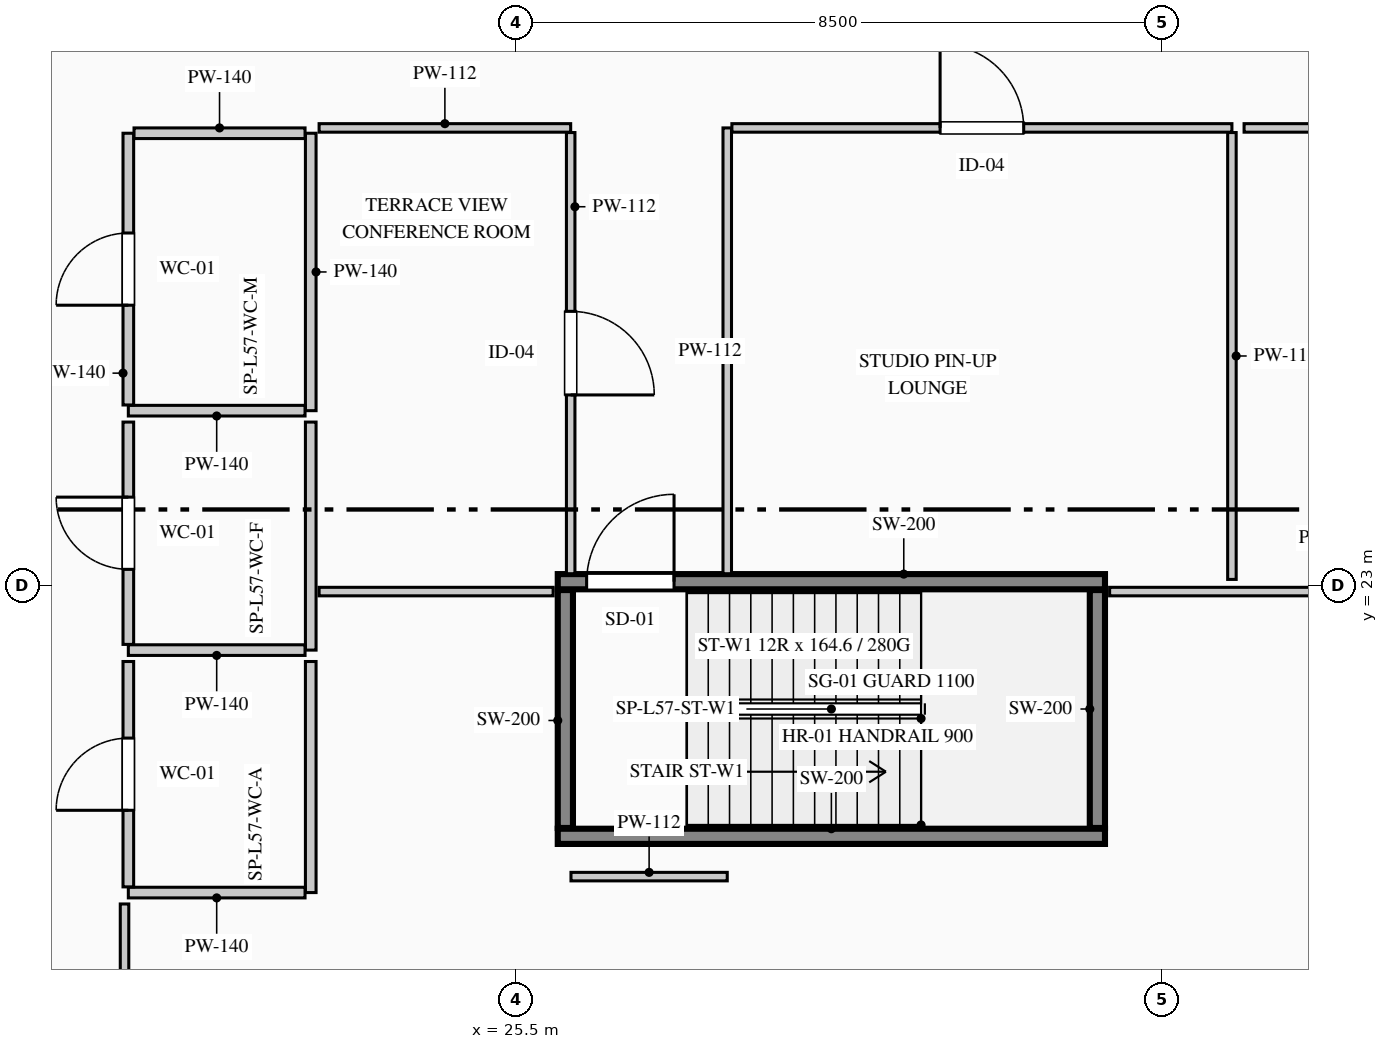
"""IFC4 building model, lengths in metres.
Left out: names, types, materials, properties, quantities, classifications, styles, units other than length and angle.
Written with IfcOpenShell. Run it as: python <this file> out.ifc"""

import sys

from ifc_helpers import new_model, si_unit, direction, frame, frame_2d, origin, place, context, subcontext, project, spatial, rectangle, extrude, element, fill, save


model = new_model("IFC4")
c1 = context("Model", 3, precision=1e-05, world=origin(), true_north=direction((0.0, 1.0)))
c2 = subcontext(c1, "Body", "Model", "MODEL_VIEW")
j1 = project(units=[si_unit("LENGTHUNIT", "METRE"), si_unit("PLANEANGLEUNIT", "RADIAN")], contexts=[c1])
p1 = place(None, origin())
s1 = spatial("IfcSite", under=j1, at=p1, CompositionType="ELEMENT")
p2 = place(p1, origin())
s2 = spatial("IfcBuilding", under=s1, at=p2, CompositionType="ELEMENT")
p3 = place(p2, frame((0.0, 0.0, 239.05)))
s3 = spatial("IfcBuildingStorey", under=s2, at=p3, CompositionType="ELEMENT", Elevation=239.05)
p4 = place(p3, frame((26.05, 19.7, 0.0), z_axis=(0.0, 0.0, 1.0), x_axis=(1.0, 0.0, 0.0)))
e1 = element("IfcWall", 1, at=p4, inside=s3, PredefinedType="SHEAR", context=c2, shape_type="SweptSolid", body=[
    extrude(rectangle(XDim=7.2, YDim=0.2, at=frame_2d((3.6, 0.0))), origin(), (0.0, 0.0, 1.0), 3.95),
])
p5 = place(p3, frame((26.05, 23.05, 0.0), z_axis=(0.0, 0.0, 1.0), x_axis=(1.0, 0.0, 0.0)))
e2 = element("IfcWall", 2, at=p5, inside=s3, PredefinedType="SHEAR", context=c2, shape_type="SweptSolid", body=[
    extrude(rectangle(XDim=7.2, YDim=0.2, at=frame_2d((3.6, 0.0))), origin(), (0.0, 0.0, 1.0), 3.95),
])
p6 = place(p5, frame((0.38, 0.0, 0.0)))
e3 = element("IfcOpeningElement", 3, at=p6, cuts=e2, PredefinedType="OPENING", context=c2, shape_type="SweptSolid", body=[
    extrude(rectangle(XDim=1.15, YDim=2.2, at=frame_2d((0.575, 1.1))), frame((0.0, 0.11, 0.0), z_axis=(0.0, -1.0, 0.0), x_axis=(1.0, 0.0, 0.0)), (0.0, 0.0, 1.0), 0.22),
])
for number, where, z_axis, x_axis in (
    (4, (26.15, 19.81, 0.0), (0.0, 0.0, 1.0), (0.0, 1.0, 0.0)),
    (5, (33.15, 19.81, 0.0), (0.0, 0.0, 1.0), (0.0, 1.0, 0.0)),
):
    element("IfcWall", number, at=place(p3, frame(where, z_axis=z_axis, x_axis=x_axis)), inside=s3, PredefinedType="SHEAR", context=c2, shape_type="SweptSolid", body=[
        extrude(rectangle(XDim=3.13, YDim=0.2, at=frame_2d((1.565, 0.0))), origin(), (0.0, 0.0, 1.0), 3.95),
    ])
p7 = place(p3, frame((22.8, 28.95, 0.0), z_axis=(0.0, 0.0, 1.0), x_axis=(0.0, -1.0, 0.0)))
e6 = element("IfcWall", 6, at=p7, inside=s3, PredefinedType="PARTITIONING", context=c2, shape_type="SweptSolid", body=[
    extrude(rectangle(XDim=3.65, YDim=0.14, at=frame_2d((1.825, 0.0))), origin(), (0.0, 0.0, 1.0), 3.325),
])
p8 = place(p3, frame((22.725, 25.3, 0.0), z_axis=(0.0, 0.0, 1.0), x_axis=(-1.0, 0.0, 0.0)))
e7 = element("IfcWall", 7, at=p8, inside=s3, PredefinedType="PARTITIONING", context=c2, shape_type="SweptSolid", body=[
    extrude(rectangle(XDim=2.325, YDim=0.14, at=frame_2d((1.163, 0.0))), origin(), (0.0, 0.0, 1.0), 3.7),
])
p9 = place(p3, frame((20.4, 25.375, 0.0), z_axis=(0.0, 0.0, 1.0), x_axis=(0.0, 1.0, 0.0)))
e8 = element("IfcWall", 8, at=p9, inside=s3, PredefinedType="PARTITIONING", context=c2, shape_type="SweptSolid", body=[
    extrude(rectangle(XDim=3.575, YDim=0.14, at=frame_2d((1.788, 0.0))), origin(), (0.0, 0.0, 1.0), 3.7),
])
p10 = place(p9, frame((1.312, 0.0, 0.0)))
e9 = element("IfcOpeningElement", 9, at=p10, cuts=e8, PredefinedType="OPENING", context=c2, shape_type="SweptSolid", body=[
    extrude(rectangle(XDim=0.95, YDim=2.15, at=frame_2d((0.475, 1.075))), frame((0.0, 0.08, 0.0), z_axis=(0.0, -1.0, 0.0), x_axis=(1.0, 0.0, 0.0)), (0.0, 0.0, 1.0), 0.16),
])
p11 = place(p3, frame((20.475, 28.95, 0.0), z_axis=(0.0, 0.0, 1.0), x_axis=(1.0, 0.0, 0.0)))
e10 = element("IfcWall", 10, at=p11, inside=s3, PredefinedType="PARTITIONING", context=c2, shape_type="SweptSolid", body=[
    extrude(rectangle(XDim=2.25, YDim=0.14, at=frame_2d((1.125, 0.0))), origin(), (0.0, 0.0, 1.0), 3.7),
])
p12 = place(p3, frame((22.8, 25.15, 0.0), z_axis=(0.0, 0.0, 1.0), x_axis=(0.0, -1.0, 0.0)))
e11 = element("IfcWall", 11, at=p12, inside=s3, PredefinedType="PARTITIONING", context=c2, shape_type="SweptSolid", body=[
    extrude(rectangle(XDim=3.0, YDim=0.14, at=frame_2d((1.5, 0.0))), origin(), (0.0, 0.0, 1.0), 3.325),
])
p13 = place(p3, frame((22.725, 22.15, 0.0), z_axis=(0.0, 0.0, 1.0), x_axis=(-1.0, 0.0, 0.0)))
e12 = element("IfcWall", 12, at=p13, inside=s3, PredefinedType="PARTITIONING", context=c2, shape_type="SweptSolid", body=[
    extrude(rectangle(XDim=2.325, YDim=0.14, at=frame_2d((1.163, 0.0))), origin(), (0.0, 0.0, 1.0), 3.7),
])
p14 = place(p3, frame((20.4, 22.225, 0.0), z_axis=(0.0, 0.0, 1.0), x_axis=(0.0, 1.0, 0.0)))
e13 = element("IfcWall", 13, at=p14, inside=s3, PredefinedType="PARTITIONING", context=c2, shape_type="SweptSolid", body=[
    extrude(rectangle(XDim=2.925, YDim=0.14, at=frame_2d((1.462, 0.0))), origin(), (0.0, 0.0, 1.0), 3.7),
])
p15 = place(p14, frame((0.988, 0.0, 0.0)))
e14 = element("IfcOpeningElement", 14, at=p15, cuts=e13, PredefinedType="OPENING", context=c2, shape_type="SweptSolid", body=[
    extrude(rectangle(XDim=0.95, YDim=2.15, at=frame_2d((0.475, 1.075))), frame((0.0, 0.08, 0.0), z_axis=(0.0, -1.0, 0.0), x_axis=(1.0, 0.0, 0.0)), (0.0, 0.0, 1.0), 0.16),
])
p16 = place(p3, frame((22.8, 22.0, 0.0), z_axis=(0.0, 0.0, 1.0), x_axis=(0.0, -1.0, 0.0)))
e15 = element("IfcWall", 15, at=p16, inside=s3, PredefinedType="PARTITIONING", context=c2, shape_type="SweptSolid", body=[
    extrude(rectangle(XDim=3.04, YDim=0.14, at=frame_2d((1.52, 0.0))), origin(), (0.0, 0.0, 1.0), 3.325),
])
p17 = place(p3, frame((22.725, 18.96, 0.0), z_axis=(0.0, 0.0, 1.0), x_axis=(-1.0, 0.0, 0.0)))
e16 = element("IfcWall", 16, at=p17, inside=s3, PredefinedType="PARTITIONING", context=c2, shape_type="SweptSolid", body=[
    extrude(rectangle(XDim=2.325, YDim=0.14, at=frame_2d((1.163, 0.0))), origin(), (0.0, 0.0, 1.0), 3.7),
])
p18 = place(p3, frame((20.4, 19.035, 0.0), z_axis=(0.0, 0.0, 1.0), x_axis=(0.0, 1.0, 0.0)))
e17 = element("IfcWall", 17, at=p18, inside=s3, PredefinedType="PARTITIONING", context=c2, shape_type="SweptSolid", body=[
    extrude(rectangle(XDim=2.965, YDim=0.14, at=frame_2d((1.482, 0.0))), origin(), (0.0, 0.0, 1.0), 3.7),
])
p19 = place(p18, frame((1.008, 0.0, 0.0)))
e18 = element("IfcOpeningElement", 18, at=p19, cuts=e17, PredefinedType="OPENING", context=c2, shape_type="SweptSolid", body=[
    extrude(rectangle(XDim=0.95, YDim=2.15, at=frame_2d((0.475, 1.075))), frame((0.0, 0.08, 0.0), z_axis=(0.0, -1.0, 0.0), x_axis=(1.0, 0.0, 0.0)), (0.0, 0.0, 1.0), 0.16),
])
p20 = place(p3, frame((33.311, 22.92, 0.0), z_axis=(0.0, 0.0, 1.0), x_axis=(1.0, 0.0, 0.0)))
e19 = element("IfcWall", 19, at=p20, inside=s3, PredefinedType="PARTITIONING", context=c2, shape_type="SweptSolid", body=[
    extrude(rectangle(XDim=5.817, YDim=0.112, at=frame_2d((2.909, 0.0))), origin(), (0.0, 0.0, 1.0), 3.7),
])
p21 = place(p3, frame((20.35, 12.689, 0.0), z_axis=(0.0, 0.0, 1.0), x_axis=(0.0, 1.0, 0.0)))
e20 = element("IfcWall", 20, at=p21, inside=s3, PredefinedType="PARTITIONING", context=c2, shape_type="SweptSolid", body=[
    extrude(rectangle(XDim=6.121, YDim=0.112, at=frame_2d((3.061, 0.0))), origin(), (0.0, 0.0, 1.0), 3.7),
])
p22 = place(p21, frame((2.511, 0.0, 0.0)))
e21 = element("IfcOpeningElement", 21, at=p22, cuts=e20, PredefinedType="OPENING", context=c2, shape_type="SweptSolid", body=[
    extrude(rectangle(XDim=1.1, YDim=2.2, at=frame_2d((0.55, 1.1))), frame((0.0, 0.066, 0.0), z_axis=(0.0, -1.0, 0.0), x_axis=(1.0, 0.0, 0.0)), (0.0, 0.0, 1.0), 0.132),
])
p23 = place(p3, frame((22.91, 22.92, 0.0), z_axis=(0.0, 0.0, 1.0), x_axis=(1.0, 0.0, 0.0)))
e22 = element("IfcWall", 22, at=p23, inside=s3, PredefinedType="PARTITIONING", context=c2, shape_type="SweptSolid", body=[
    extrude(rectangle(XDim=3.079, YDim=0.112, at=frame_2d((1.54, 0.0))), origin(), (0.0, 0.0, 1.0), 3.7),
])
p24 = place(p3, frame((26.224, 19.17, 0.0), z_axis=(0.0, 0.0, 1.0), x_axis=(1.0, 0.0, 0.0)))
e23 = element("IfcWall", 23, at=p24, inside=s3, PredefinedType="PARTITIONING", context=c2, shape_type="SweptSolid", body=[
    extrude(rectangle(XDim=2.056, YDim=0.112, at=frame_2d((1.028, 0.0))), origin(), (0.0, 0.0, 1.0), 3.7),
])
p25 = place(p3, frame((22.91, 29.02, 0.0), z_axis=(0.0, 0.0, 1.0), x_axis=(1.0, 0.0, 0.0)))
e24 = element("IfcWall", 24, at=p25, inside=s3, PredefinedType="PARTITIONING", context=c2, shape_type="SweptSolid", body=[
    extrude(rectangle(XDim=3.31, YDim=0.112, at=frame_2d((1.655, 0.0))), origin(), (0.0, 0.0, 1.0), 3.485),
])
p26 = place(p3, frame((26.22, 28.959, 0.0), z_axis=(0.0, 0.0, 1.0), x_axis=(0.0, -1.0, 0.0)))
e25 = element("IfcWall", 25, at=p26, inside=s3, PredefinedType="PARTITIONING", context=c2, shape_type="SweptSolid", body=[
    extrude(rectangle(XDim=5.804, YDim=0.112, at=frame_2d((2.902, 0.0))), origin(), (0.0, 0.0, 1.0), 3.7),
])
p27 = place(p26, frame((2.352, 0.0, 0.0)))
e26 = element("IfcOpeningElement", 26, at=p27, cuts=e25, PredefinedType="OPENING", context=c2, shape_type="SweptSolid", body=[
    extrude(rectangle(XDim=1.1, YDim=2.2, at=frame_2d((0.55, 1.1))), frame((0.0, 0.066, 0.0), z_axis=(0.0, -1.0, 0.0), x_axis=(1.0, 0.0, 0.0)), (0.0, 0.0, 1.0), 0.132),
])
p28 = place(p3, frame((28.28, 23.155, 0.0), z_axis=(0.0, 0.0, 1.0), x_axis=(0.0, 1.0, 0.0)))
e27 = element("IfcWall", 27, at=p28, inside=s3, PredefinedType="PARTITIONING", context=c2, shape_type="SweptSolid", body=[
    extrude(rectangle(XDim=5.865, YDim=0.112, at=frame_2d((2.933, 0.0))), origin(), (0.0, 0.0, 1.0), 3.7),
])
p29 = place(p3, frame((28.341, 29.02, 0.0), z_axis=(0.0, 0.0, 1.0), x_axis=(1.0, 0.0, 0.0)))
e28 = element("IfcWall", 28, at=p29, inside=s3, PredefinedType="PARTITIONING", context=c2, shape_type="SweptSolid", body=[
    extrude(rectangle(XDim=6.579, YDim=0.112, at=frame_2d((3.29, 0.0))), origin(), (0.0, 0.0, 1.0), 3.485),
])
p30 = place(p29, frame((2.74, 0.0, 0.0)))
e29 = element("IfcOpeningElement", 29, at=p30, cuts=e28, PredefinedType="OPENING", context=c2, shape_type="SweptSolid", body=[
    extrude(rectangle(XDim=1.1, YDim=2.2, at=frame_2d((0.55, 1.1))), frame((0.0, 0.066, 0.0), z_axis=(0.0, -1.0, 0.0), x_axis=(1.0, 0.0, 0.0)), (0.0, 0.0, 1.0), 0.132),
])
p31 = place(p3, frame((34.92, 28.959, 0.0), z_axis=(0.0, 0.0, 1.0), x_axis=(0.0, -1.0, 0.0)))
e30 = element("IfcWall", 30, at=p31, inside=s3, PredefinedType="PARTITIONING", context=c2, shape_type="SweptSolid", body=[
    extrude(rectangle(XDim=5.879, YDim=0.112, at=frame_2d((2.939, 0.0))), origin(), (0.0, 0.0, 1.0), 3.7),
])
p32 = place(p3, frame((35.08, 29.02, 0.0), z_axis=(0.0, 0.0, 1.0), x_axis=(1.0, 0.0, 0.0)))
e31 = element("IfcWall", 31, at=p32, inside=s3, PredefinedType="PARTITIONING", context=c2, shape_type="SweptSolid", body=[
    extrude(rectangle(XDim=2.6, YDim=0.112, at=frame_2d((1.3, 0.0))), origin(), (0.0, 0.0, 1.0), 3.7),
])
p33 = place(p6, origin())
e32 = element("IfcDoor", 32, at=p33, inside=s3, OperationType="SINGLE_SWING_RIGHT", PredefinedType="DOOR", context=c2, shape_type="SweptSolid", body=[
    extrude(rectangle(XDim=1.15, YDim=2.2, at=frame_2d((0.575, 1.1))), frame((0.0, 0.025, 0.0), z_axis=(0.0, -1.0, 0.0), x_axis=(1.0, 0.0, 0.0)), (0.0, 0.0, 1.0), 0.05),
])
fill(e3, e32)
p34 = place(p10, origin())
e33 = element("IfcDoor", 33, at=p34, inside=s3, OperationType="SINGLE_SWING_LEFT", PredefinedType="DOOR", context=c2, shape_type="SweptSolid", body=[
    extrude(rectangle(XDim=0.95, YDim=2.15, at=frame_2d((0.475, 1.075))), frame((0.0, 0.025, 0.0), z_axis=(0.0, -1.0, 0.0), x_axis=(1.0, 0.0, 0.0)), (0.0, 0.0, 1.0), 0.05),
])
fill(e9, e33)
p35 = place(p15, origin())
e34 = element("IfcDoor", 34, at=p35, inside=s3, OperationType="SINGLE_SWING_RIGHT", PredefinedType="DOOR", context=c2, shape_type="SweptSolid", body=[
    extrude(rectangle(XDim=0.95, YDim=2.15, at=frame_2d((0.475, 1.075))), frame((0.0, 0.025, 0.0), z_axis=(0.0, -1.0, 0.0), x_axis=(1.0, 0.0, 0.0)), (0.0, 0.0, 1.0), 0.05),
])
fill(e14, e34)
p36 = place(p19, origin())
e35 = element("IfcDoor", 35, at=p36, inside=s3, OperationType="SINGLE_SWING_LEFT", PredefinedType="DOOR", context=c2, shape_type="SweptSolid", body=[
    extrude(rectangle(XDim=0.95, YDim=2.15, at=frame_2d((0.475, 1.075))), frame((0.0, 0.025, 0.0), z_axis=(0.0, -1.0, 0.0), x_axis=(1.0, 0.0, 0.0)), (0.0, 0.0, 1.0), 0.05),
])
fill(e18, e35)
p37 = place(p27, origin())
e36 = element("IfcDoor", 36, at=p37, inside=s3, OperationType="SINGLE_SWING_RIGHT", PredefinedType="DOOR", context=c2, shape_type="SweptSolid", body=[
    extrude(rectangle(XDim=1.1, YDim=2.2, at=frame_2d((0.55, 1.1))), frame((0.0, 0.025, 0.0), z_axis=(0.0, -1.0, 0.0), x_axis=(1.0, 0.0, 0.0)), (0.0, 0.0, 1.0), 0.05),
])
fill(e26, e36)
p38 = place(p30, origin())
e37 = element("IfcDoor", 37, at=p38, inside=s3, OperationType="SINGLE_SWING_LEFT", PredefinedType="DOOR", context=c2, shape_type="SweptSolid", body=[
    extrude(rectangle(XDim=1.1, YDim=2.2, at=frame_2d((0.55, 1.1))), frame((0.0, 0.025, 0.0), z_axis=(0.0, -1.0, 0.0), x_axis=(1.0, 0.0, 0.0)), (0.0, 0.0, 1.0), 0.05),
])
fill(e29, e37)
save(model, sys.argv[1])
